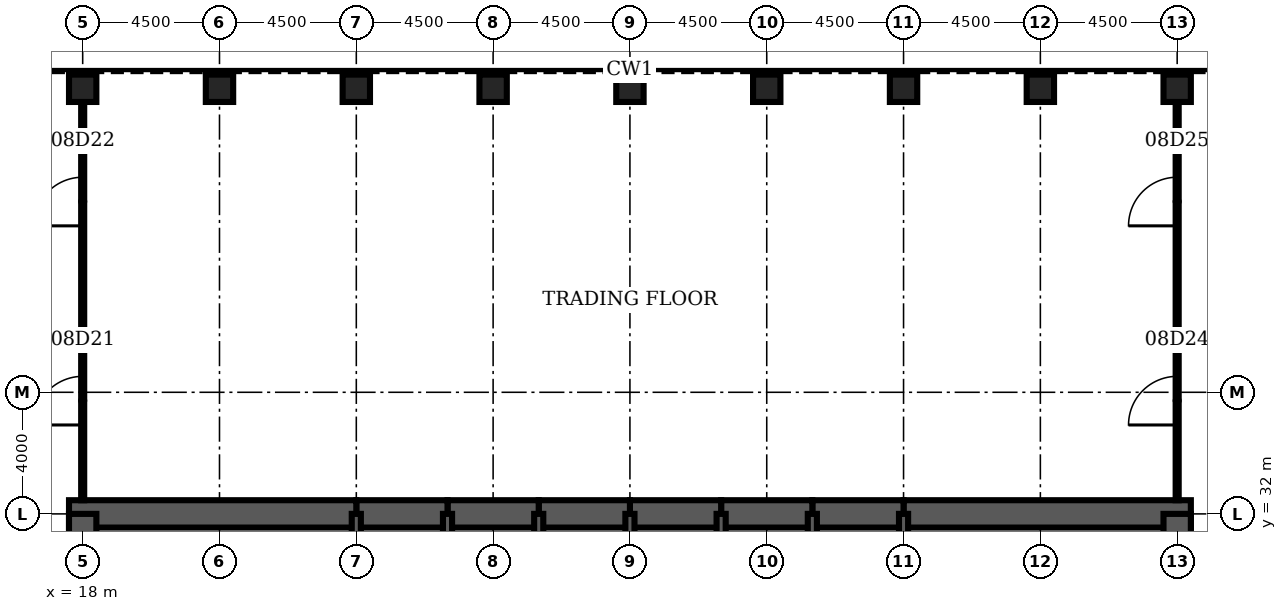
"""IFC4 building model, lengths in metres.
Left out: names, types, materials, properties, quantities, classifications, styles, units other than length and angle.
Written with IfcOpenShell. Run it as: python <this file> out.ifc"""

import sys

from ifc_helpers import new_model, si_unit, direction, frame, frame_2d, origin, origin_2d, place, context, subcontext, project, spatial, rectangle, hollow_rectangle, extrude, element, fill, save


model = new_model("IFC4")
c1 = context("Model", 3, precision=1e-05, world=origin(), true_north=direction((0.0, 1.0)))
c2 = subcontext(c1, "Body", "Model", "MODEL_VIEW")
j1 = project(units=[si_unit("LENGTHUNIT", "METRE"), si_unit("PLANEANGLEUNIT", "RADIAN")], contexts=[c1])
p1 = place(None, origin())
s1 = spatial("IfcSite", under=j1, at=p1, CompositionType="ELEMENT")
p2 = place(p1, origin())
s2 = spatial("IfcBuilding", under=s1, at=p2, CompositionType="ELEMENT")
p3 = place(p2, frame((0.0, 0.0, 41.0)))
s3 = spatial("IfcBuildingStorey", under=s2, at=p3, CompositionType="ELEMENT", Elevation=41.0)
for number, where, z_axis, x_axis in (
    (1, (54.0, 46.0, 0.0), (0.0, 0.0, 1.0), (0.0, 1.0, 0.0)),
    (2, (49.5, 46.0, 0.0), (0.0, 0.0, 1.0), (0.0, 1.0, 0.0)),
    (3, (45.0, 46.0, 0.0), (0.0, 0.0, 1.0), (0.0, 1.0, 0.0)),
    (4, (40.5, 46.0, 0.0), (0.0, 0.0, 1.0), (0.0, 1.0, 0.0)),
    (5, (36.0, 46.0, 0.0), (0.0, 0.0, 1.0), (0.0, 1.0, 0.0)),
    (6, (31.5, 46.0, 0.0), (0.0, 0.0, 1.0), (0.0, 1.0, 0.0)),
    (7, (27.0, 46.0, 0.0), (0.0, 0.0, 1.0), (0.0, 1.0, 0.0)),
    (8, (22.5, 46.0, 0.0), (0.0, 0.0, 1.0), (0.0, 1.0, 0.0)),
    (9, (18.0, 46.0, 0.0), (0.0, 0.0, 1.0), (0.0, 1.0, 0.0)),
):
    element("IfcColumn", number, at=place(p3, frame(where, z_axis=z_axis, x_axis=x_axis)), inside=s3, PredefinedType="COLUMN", context=c2, shape_type="SweptSolid", body=[
        extrude(hollow_rectangle(XDim=0.9, YDim=0.9, WallThickness=0.12, at=origin_2d()), origin(), (0.0, 0.0, 1.0), 4.5),
    ])
p4 = place(p3, frame((54.45, 32.0, 0.0), z_axis=(0.0, 0.0, 1.0), x_axis=(-1.0, 0.0, 0.0)))
e10 = element("IfcWall", 10, at=p4, inside=s3, PredefinedType="SHEAR", context=c2, shape_type="SweptSolid", body=[
    extrude(rectangle(XDim=9.45, YDim=0.9, at=frame_2d((4.725, 0.0))), origin(), (0.0, 0.0, 1.0), 4.5),
])
for number, where, z_axis, x_axis in (
    (11, (45.0, 32.0, 0.0), (0.0, 0.0, 1.0), (-1.0, 0.0, 0.0)),
    (12, (42.0, 32.0, 0.0), (0.0, 0.0, 1.0), (-1.0, 0.0, 0.0)),
    (13, (39.0, 32.0, 0.0), (0.0, 0.0, 1.0), (-1.0, 0.0, 0.0)),
    (14, (36.0, 32.0, 0.0), (0.0, 0.0, 1.0), (-1.0, 0.0, 0.0)),
    (15, (33.0, 32.0, 0.0), (0.0, 0.0, 1.0), (-1.0, 0.0, 0.0)),
    (16, (30.0, 32.0, 0.0), (0.0, 0.0, 1.0), (-1.0, 0.0, 0.0)),
):
    element("IfcWall", number, at=place(p3, frame(where, z_axis=z_axis, x_axis=x_axis)), inside=s3, PredefinedType="SHEAR", context=c2, shape_type="SweptSolid", body=[
        extrude(rectangle(XDim=3.0, YDim=0.9, at=frame_2d((1.5, 0.0))), origin(), (0.0, 0.0, 1.0), 4.5),
    ])
p5 = place(p3, frame((27.0, 32.0, 0.0), z_axis=(0.0, 0.0, 1.0), x_axis=(-1.0, 0.0, 0.0)))
e17 = element("IfcWall", 17, at=p5, inside=s3, PredefinedType="SHEAR", context=c2, shape_type="SweptSolid", body=[
    extrude(rectangle(XDim=9.45, YDim=0.9, at=frame_2d((4.725, 0.0))), origin(), (0.0, 0.0, 1.0), 4.5),
])
for number, where, z_axis, x_axis in (
    (18, (18.0, 32.0, 0.0), (0.0, 0.0, 1.0), (0.0, -1.0, 0.0)),
    (19, (54.0, 28.8, 0.0), (0.0, 0.0, 1.0), (0.0, 1.0, 0.0)),
):
    element("IfcWall", number, at=place(p3, frame(where, z_axis=z_axis, x_axis=x_axis)), inside=s3, PredefinedType="SHEAR", context=c2, shape_type="SweptSolid", body=[
        extrude(rectangle(XDim=3.2, YDim=0.9, at=frame_2d((1.6, 0.0))), origin(), (0.0, 0.0, 1.0), 4.5),
    ])
for number, where, z_axis, x_axis in (
    (20, (27.0, 28.8, 0.0), (0.0, 0.0, 1.0), (0.0, 1.0, 0.0)),
    (21, (30.0, 28.8, 0.0), (0.0, 0.0, 1.0), (0.0, 1.0, 0.0)),
    (22, (33.0, 28.8, 0.0), (0.0, 0.0, 1.0), (0.0, 1.0, 0.0)),
    (23, (36.0, 28.8, 0.0), (0.0, 0.0, 1.0), (0.0, 1.0, 0.0)),
    (24, (39.0, 28.8, 0.0), (0.0, 0.0, 1.0), (0.0, 1.0, 0.0)),
    (25, (42.0, 28.8, 0.0), (0.0, 0.0, 1.0), (0.0, 1.0, 0.0)),
    (26, (45.0, 28.8, 0.0), (0.0, 0.0, 1.0), (0.0, 1.0, 0.0)),
):
    element("IfcWall", number, at=place(p3, frame(where, z_axis=z_axis, x_axis=x_axis)), inside=s3, PredefinedType="SOLIDWALL", context=c2, shape_type="SweptSolid", body=[
        extrude(rectangle(XDim=3.2, YDim=0.3, at=frame_2d((1.6, 0.0))), origin(), (0.0, 0.0, 1.0), 4.5),
    ])
p6 = place(p3, frame((18.0, 32.45, 0.0), z_axis=(0.0, 0.0, 1.0), x_axis=(0.0, 1.0, 0.0)))
e27 = element("IfcWall", 27, at=p6, inside=s3, PredefinedType="PARTITIONING", context=c2, shape_type="SweptSolid", body=[
    extrude(rectangle(XDim=13.1, YDim=0.1, at=frame_2d((6.55, 0.0))), origin(), (0.0, 0.0, 1.0), 3.0),
])
p7 = place(p6, frame((2.475, 0.0, 0.0)))
e28 = element("IfcOpeningElement", 28, at=p7, cuts=e27, PredefinedType="OPENING", context=c2, shape_type="SweptSolid", body=[
    extrude(rectangle(XDim=1.6, YDim=2.1, at=frame_2d((0.8, 1.05))), frame((0.0, 0.06, 0.0), z_axis=(0.0, -1.0, 0.0), x_axis=(1.0, 0.0, 0.0)), (0.0, 0.0, 1.0), 0.12),
])
p8 = place(p6, frame((9.025, 0.0, 0.0)))
e29 = element("IfcOpeningElement", 29, at=p8, cuts=e27, PredefinedType="OPENING", context=c2, shape_type="SweptSolid", body=[
    extrude(rectangle(XDim=1.6, YDim=2.1, at=frame_2d((0.8, 1.05))), frame((0.0, 0.06, 0.0), z_axis=(0.0, -1.0, 0.0), x_axis=(1.0, 0.0, 0.0)), (0.0, 0.0, 1.0), 0.12),
])
p9 = place(p3, frame((54.0, 32.45, 0.0), z_axis=(0.0, 0.0, 1.0), x_axis=(0.0, 1.0, 0.0)))
e30 = element("IfcWall", 30, at=p9, inside=s3, PredefinedType="PARTITIONING", context=c2, shape_type="SweptSolid", body=[
    extrude(rectangle(XDim=13.1, YDim=0.1, at=frame_2d((6.55, 0.0))), origin(), (0.0, 0.0, 1.0), 3.0),
])
p10 = place(p9, frame((2.475, 0.0, 0.0)))
e31 = element("IfcOpeningElement", 31, at=p10, cuts=e30, PredefinedType="OPENING", context=c2, shape_type="SweptSolid", body=[
    extrude(rectangle(XDim=1.6, YDim=2.1, at=frame_2d((0.8, 1.05))), frame((0.0, 0.06, 0.0), z_axis=(0.0, -1.0, 0.0), x_axis=(1.0, 0.0, 0.0)), (0.0, 0.0, 1.0), 0.12),
])
p11 = place(p9, frame((9.025, 0.0, 0.0)))
e32 = element("IfcOpeningElement", 32, at=p11, cuts=e30, PredefinedType="OPENING", context=c2, shape_type="SweptSolid", body=[
    extrude(rectangle(XDim=1.6, YDim=2.1, at=frame_2d((0.8, 1.05))), frame((0.0, 0.06, 0.0), z_axis=(0.0, -1.0, 0.0), x_axis=(1.0, 0.0, 0.0)), (0.0, 0.0, 1.0), 0.12),
])
p12 = place(p7, origin())
e33 = element("IfcDoor", 33, at=p12, inside=s3, OperationType="SINGLE_SWING_LEFT", PredefinedType="DOOR", context=c2, shape_type="SweptSolid", body=[
    extrude(rectangle(XDim=1.6, YDim=2.1, at=frame_2d((0.8, 1.05))), frame((0.0, 0.025, 0.0), z_axis=(0.0, -1.0, 0.0), x_axis=(1.0, 0.0, 0.0)), (0.0, 0.0, 1.0), 0.05),
])
fill(e28, e33)
p13 = place(p8, origin())
e34 = element("IfcDoor", 34, at=p13, inside=s3, OperationType="SINGLE_SWING_LEFT", PredefinedType="DOOR", context=c2, shape_type="SweptSolid", body=[
    extrude(rectangle(XDim=1.6, YDim=2.1, at=frame_2d((0.8, 1.05))), frame((0.0, 0.025, 0.0), z_axis=(0.0, -1.0, 0.0), x_axis=(1.0, 0.0, 0.0)), (0.0, 0.0, 1.0), 0.05),
])
fill(e29, e34)
p14 = place(p10, origin())
e35 = element("IfcDoor", 35, at=p14, inside=s3, OperationType="SINGLE_SWING_LEFT", PredefinedType="DOOR", context=c2, shape_type="SweptSolid", body=[
    extrude(rectangle(XDim=1.6, YDim=2.1, at=frame_2d((0.8, 1.05))), frame((0.0, 0.025, 0.0), z_axis=(0.0, -1.0, 0.0), x_axis=(1.0, 0.0, 0.0)), (0.0, 0.0, 1.0), 0.05),
])
fill(e31, e35)
p15 = place(p11, origin())
e36 = element("IfcDoor", 36, at=p15, inside=s3, OperationType="SINGLE_SWING_LEFT", PredefinedType="DOOR", context=c2, shape_type="SweptSolid", body=[
    extrude(rectangle(XDim=1.6, YDim=2.1, at=frame_2d((0.8, 1.05))), frame((0.0, 0.025, 0.0), z_axis=(0.0, -1.0, 0.0), x_axis=(1.0, 0.0, 0.0)), (0.0, 0.0, 1.0), 0.05),
])
fill(e32, e36)
save(model, sys.argv[1])
